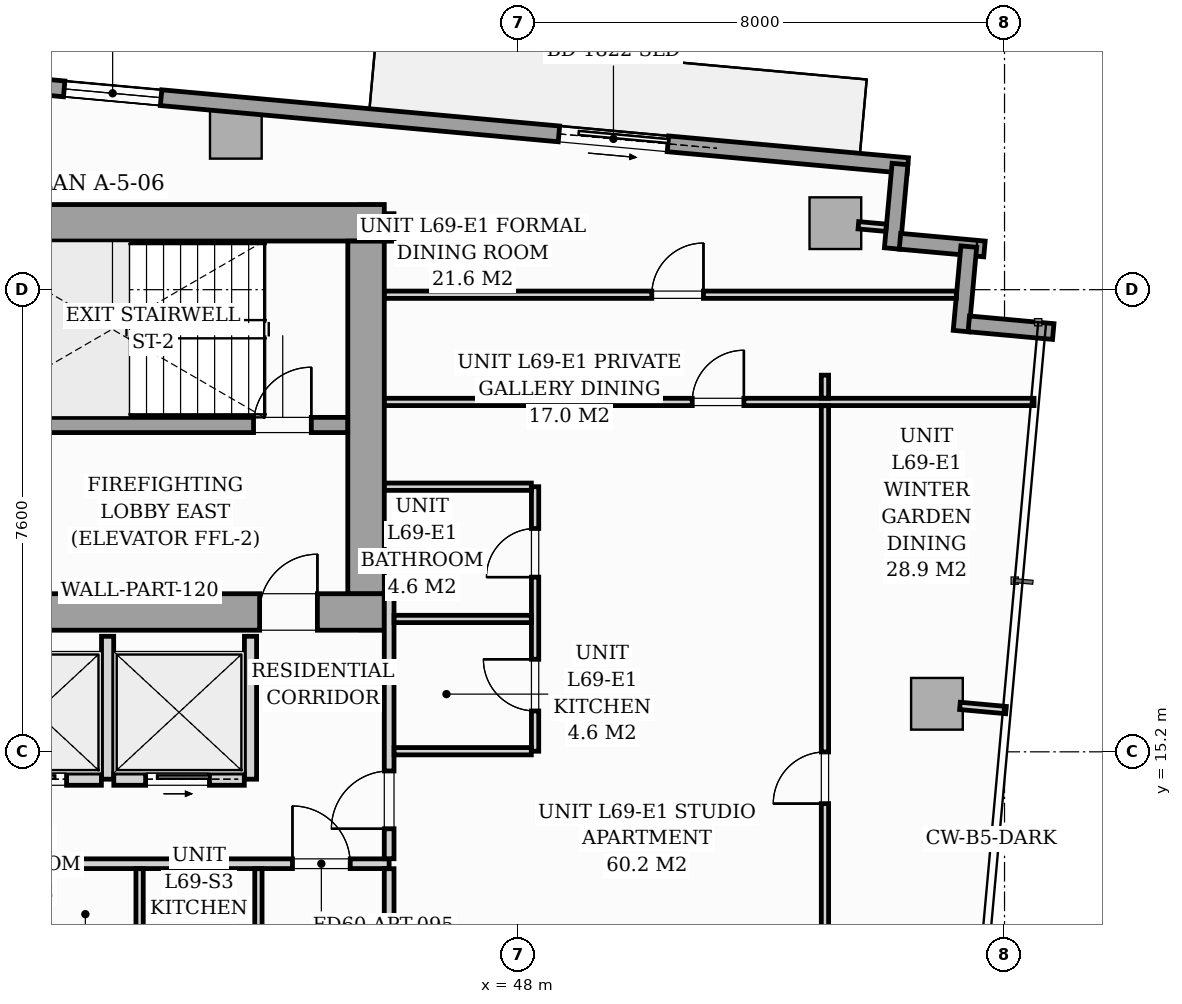
"""IFC4 building model, lengths in metres.
Left out: names, types, materials, properties, quantities, classifications, styles, units other than length and angle.
Written with IfcOpenShell. Run it as: python <this file> out.ifc"""

import sys

from ifc_helpers import new_model, si_unit, direction, frame, frame_2d, origin, origin_2d, place, context, subcontext, project, spatial, rectangle, i_section, extrude, source, transform, mapped, element, fill, save


model = new_model("IFC4")
c1 = context("Model", 3, precision=1e-05, world=origin(), true_north=direction((0.0, 1.0)))
c2 = subcontext(c1, "Body", "Model", "MODEL_VIEW")
j1 = project(units=[si_unit("LENGTHUNIT", "METRE"), si_unit("PLANEANGLEUNIT", "RADIAN")], contexts=[c1])
p1 = place(None, origin())
s1 = spatial("IfcSite", under=j1, at=p1, CompositionType="ELEMENT")
p2 = place(p1, origin())
s2 = spatial("IfcBuilding", under=s1, at=p2, CompositionType="ELEMENT")
p3 = place(p2, frame((0.0, 0.0, 239.7)))
s3 = spatial("IfcBuildingStorey", under=s2, at=p3, CompositionType="ELEMENT", Elevation=239.7)
m1 = source(origin(), c2, "Body", "SweptSolid", [
    extrude(i_section(OverallWidth=0.409, OverallDepth=0.425, WebThickness=0.033, FlangeThickness=0.052, FilletRadius=0.018, at=origin_2d()), origin(), (0.0, 0.0, 1.0), 3.296),
])
for number, where, z_axis, x_axis in (
    (1, (45.6, 17.4, 0.002), (0.0, 0.0, 1.0), (1.0, 0.0, 0.0)),
    (2, (45.6, 24.0, 0.002), (0.0, 0.0, 1.0), (1.0, 0.0, 0.0)),
):
    element("IfcColumn", number, at=place(p3, frame(where, z_axis=z_axis, x_axis=x_axis)), inside=s3, PredefinedType="PILASTER", context=c2, shape_type="MappedRepresentation", body=[
        mapped(m1, transform((0.0, 0.0, 0.0), scale=1.0)),
    ])
m2 = source(origin(), c2, "Body", "SweptSolid", [
    extrude(rectangle(XDim=0.85, YDim=0.85, at=origin_2d()), origin(), (0.0, 0.0, 1.0), 3.296),
])
for number, where, z_axis, x_axis in (
    (3, (43.359, 25.38, 0.002), (0.0, 0.0, 1.0), (0.996, -0.091, 0.0)),
    (4, (53.218, 23.894, 0.002), (0.0, 0.0, 1.0), (0.996, -0.091, 0.0)),
    (5, (54.889, 15.99, 0.002), (0.0, 0.0, 1.0), (0.996, -0.091, 0.0)),
):
    element("IfcColumn", number, at=place(p3, frame(where, z_axis=z_axis, x_axis=x_axis)), inside=s3, PredefinedType="COLUMN", context=c2, shape_type="MappedRepresentation", body=[
        mapped(m2, transform((0.0, 0.0, 0.0), scale=1.0)),
    ])
p4 = place(p3, frame((39.839, 26.166, 0.0), z_axis=(0.0, 0.0, 1.0), x_axis=(0.995884447498, -0.090632043071, 0.0)))
e6 = element("IfcWall", 6, at=p4, inside=s3, PredefinedType="STANDARD", context=c2, shape_type="SweptSolid", body=[
    extrude(rectangle(XDim=14.63, YDim=0.26, at=frame_2d((7.315, 0.0))), origin(), (0.0, 0.0, 1.0), 3.04),
])
p5 = place(p4, frame((8.87, 0.0, 0.0)))
e7 = element("IfcOpeningElement", 7, at=p5, cuts=e6, PredefinedType="OPENING", context=c2, shape_type="SweptSolid", body=[
    extrude(rectangle(XDim=1.8, YDim=2.06, at=frame_2d((0.9, 1.03))), frame((0.0, 0.14, 0.0), z_axis=(0.0, -1.0, 0.0), x_axis=(1.0, 0.0, 0.0)), (0.0, 0.0, 1.0), 0.28),
])
p6 = place(p4, frame((0.7, 0.0, 0.65)))
e8 = element("IfcOpeningElement", 8, at=p6, cuts=e6, PredefinedType="OPENING", context=c2, shape_type="SweptSolid", body=[
    extrude(rectangle(XDim=1.6, YDim=1.5, at=frame_2d((0.8, 0.75))), frame((0.0, 0.14, 0.0), z_axis=(0.0, -1.0, 0.0), x_axis=(1.0, 0.0, 0.0)), (0.0, 0.0, 1.0), 0.28),
])
p7 = place(p3, frame((54.281, 24.866, 0.0), z_axis=(0.0, 0.0, 1.0), x_axis=(-0.090661991521, -0.995881721538, 0.0)))
e9 = element("IfcWall", 9, at=p7, inside=s3, PredefinedType="STANDARD", context=c2, shape_type="SweptSolid", body=[
    extrude(rectangle(XDim=1.395, YDim=0.26, at=frame_2d((0.698, 0.0))), origin(), (0.0, 0.0, 1.0), 3.04),
])
for number, where, z_axis, x_axis in (
    (10, (54.281, 23.596, 0.0), (0.0, 0.0, 1.0), (0.996, -0.091, 0.0)),
    (11, (55.412, 23.508, 0.0), (0.0, 0.0, 1.0), (-0.091, -0.996, 0.0)),
    (12, (55.412, 22.238, 0.0), (0.0, 0.0, 1.0), (0.996, -0.091, 0.0)),
):
    element("IfcWall", number, at=place(p3, frame(where, z_axis=z_axis, x_axis=x_axis)), inside=s3, PredefinedType="STANDARD", context=c2, shape_type="SweptSolid", body=[
        extrude(rectangle(XDim=1.395, YDim=0.26, at=frame_2d((0.698, 0.0))), origin(), (0.0, 0.0, 1.0), 3.04),
    ])
p8 = place(p3, frame((26.2, 17.5, 0.0), z_axis=(0.0, 0.0, 1.0), x_axis=(1.0, 0.0, 0.0)))
e13 = element("IfcWall", 13, at=p8, inside=s3, PredefinedType="SHEAR", context=c2, shape_type="SweptSolid", body=[
    extrude(rectangle(XDim=19.6, YDim=0.6, at=frame_2d((9.8, 0.0))), origin(), (0.0, 0.0, 1.0), 3.3),
])
p9 = place(p8, frame((0.95, 0.0, 0.0)))
e14 = element("IfcOpeningElement", 14, at=p9, cuts=e13, PredefinedType="OPENING", context=c2, shape_type="SweptSolid", body=[
    extrude(rectangle(XDim=0.95, YDim=2.06, at=frame_2d((0.475, 1.03))), frame((0.0, 0.31, 0.0), z_axis=(0.0, -1.0, 0.0), x_axis=(1.0, 0.0, 0.0)), (0.0, 0.0, 1.0), 0.62),
])
p10 = place(p8, frame((9.38, 0.0, 0.0)))
e15 = element("IfcOpeningElement", 15, at=p10, cuts=e13, PredefinedType="OPENING", context=c2, shape_type="SweptSolid", body=[
    extrude(rectangle(XDim=0.85, YDim=2.0, at=frame_2d((0.425, 1.0))), frame((0.0, 0.31, 0.0), z_axis=(0.0, -1.0, 0.0), x_axis=(1.0, 0.0, 0.0)), (0.0, 0.0, 1.0), 0.62),
])
p11 = place(p8, frame((17.55, 0.0, 0.0)))
e16 = element("IfcOpeningElement", 16, at=p11, cuts=e13, PredefinedType="OPENING", context=c2, shape_type="SweptSolid", body=[
    extrude(rectangle(XDim=0.95, YDim=2.06, at=frame_2d((0.475, 1.03))), frame((0.0, 0.31, 0.0), z_axis=(0.0, -1.0, 0.0), x_axis=(1.0, 0.0, 0.0)), (0.0, 0.0, 1.0), 0.62),
])
p12 = place(p3, frame((26.2, 23.9, 0.0), z_axis=(0.0, 0.0, 1.0), x_axis=(1.0, 0.0, 0.0)))
e17 = element("IfcWall", 17, at=p12, inside=s3, PredefinedType="SHEAR", context=c2, shape_type="SweptSolid", body=[
    extrude(rectangle(XDim=19.6, YDim=0.6, at=frame_2d((9.8, 0.0))), origin(), (0.0, 0.0, 1.0), 3.3),
])
p13 = place(p3, frame((45.5, 17.802, 0.0), z_axis=(0.0, 0.0, 1.0), x_axis=(0.0, 1.0, 0.0)))
e18 = element("IfcWall", 18, at=p13, inside=s3, PredefinedType="SHEAR", context=c2, shape_type="SweptSolid", body=[
    extrude(rectangle(XDim=5.796, YDim=0.6, at=frame_2d((2.898, 0.0))), origin(), (0.0, 0.0, 1.0), 3.3),
])
p14 = place(p3, frame((37.05, 20.575, 0.0), z_axis=(0.0, 0.0, 1.0), x_axis=(1.0, 0.0, 0.0)))
e19 = element("IfcWall", 19, at=p14, inside=s3, PredefinedType="SOLIDWALL", context=c2, shape_type="SweptSolid", body=[
    extrude(rectangle(XDim=8.148, YDim=0.25, at=frame_2d((4.074, 0.0))), origin(), (0.0, 0.0, 1.0), 3.3),
])
p15 = place(p14, frame((6.6, 0.0, 0.0)))
e20 = element("IfcOpeningElement", 20, at=p15, cuts=e19, PredefinedType="OPENING", context=c2, shape_type="SweptSolid", body=[
    extrude(rectangle(XDim=0.95, YDim=2.06, at=frame_2d((0.475, 1.03))), frame((0.0, 0.135, 0.0), z_axis=(0.0, -1.0, 0.0), x_axis=(1.0, 0.0, 0.0)), (0.0, 0.0, 1.0), 0.27),
])
for number, where, z_axis, x_axis in (
    (21, (41.25, 14.75, 0.0), (0.0, 0.0, 1.0), (0.0, 1.0, 0.0)),
    (22, (43.6, 14.75, 0.0), (0.0, 0.0, 1.0), (0.0, 1.0, 0.0)),
):
    element("IfcWall", number, at=place(p3, frame(where, z_axis=z_axis, x_axis=x_axis)), inside=s3, PredefinedType="PARTITIONING", context=c2, shape_type="SweptSolid", body=[
        extrude(rectangle(XDim=2.35, YDim=0.2, at=frame_2d((1.175, 0.0))), origin(), (0.0, 0.0, 1.0), 3.04),
    ])
p16 = place(p3, frame((39.002, 14.75, 0.0), z_axis=(0.0, 0.0, 1.0), x_axis=(1.0, 0.0, 0.0)))
e23 = element("IfcWall", 23, at=p16, inside=s3, PredefinedType="PARTITIONING", context=c2, shape_type="SweptSolid", body=[
    extrude(rectangle(XDim=2.146, YDim=0.2, at=frame_2d((1.073, 0.0))), origin(), (0.0, 0.0, 1.0), 3.04),
])
p17 = place(p16, frame((0.523, 0.0, 0.0)))
e24 = element("IfcOpeningElement", 24, at=p17, cuts=e23, PredefinedType="OPENING", context=c2, shape_type="SweptSolid", body=[
    extrude(rectangle(XDim=1.05, YDim=2.08, at=frame_2d((0.525, 1.04))), frame((0.0, 0.11, 0.0), z_axis=(0.0, -1.0, 0.0), x_axis=(1.0, 0.0, 0.0)), (0.0, 0.0, 1.0), 0.22),
])
p18 = place(p3, frame((41.352, 14.75, 0.0), z_axis=(0.0, 0.0, 1.0), x_axis=(1.0, 0.0, 0.0)))
e25 = element("IfcWall", 25, at=p18, inside=s3, PredefinedType="PARTITIONING", context=c2, shape_type="SweptSolid", body=[
    extrude(rectangle(XDim=2.146, YDim=0.2, at=frame_2d((1.073, 0.0))), origin(), (0.0, 0.0, 1.0), 3.04),
])
p19 = place(p18, frame((0.523, 0.0, 0.0)))
e26 = element("IfcOpeningElement", 26, at=p19, cuts=e25, PredefinedType="OPENING", context=c2, shape_type="SweptSolid", body=[
    extrude(rectangle(XDim=1.05, YDim=2.08, at=frame_2d((0.525, 1.04))), frame((0.0, 0.11, 0.0), z_axis=(0.0, -1.0, 0.0), x_axis=(1.0, 0.0, 0.0)), (0.0, 0.0, 1.0), 0.22),
])
p20 = place(p3, frame((26.12, 13.36, 0.0), z_axis=(0.0, 0.0, 1.0), x_axis=(1.0, 0.0, 0.0)))
e27 = element("IfcWall", 27, at=p20, inside=s3, PredefinedType="PARTITIONING", context=c2, shape_type="SweptSolid", body=[
    extrude(rectangle(XDim=19.76, YDim=0.16, at=frame_2d((9.88, 0.0))), origin(), (0.0, 0.0, 1.0), 2.605),
])
p21 = place(p20, frame((5.221, 0.0, 0.0)))
e28 = element("IfcOpeningElement", 28, at=p21, cuts=e27, PredefinedType="OPENING", context=c2, shape_type="SweptSolid", body=[
    extrude(rectangle(XDim=0.95, YDim=2.06, at=frame_2d((0.475, 1.03))), frame((0.0, 0.09, 0.0), z_axis=(0.0, -1.0, 0.0), x_axis=(1.0, 0.0, 0.0)), (0.0, 0.0, 1.0), 0.18),
])
p22 = place(p20, frame((8.074, 0.0, 0.0)))
e29 = element("IfcOpeningElement", 29, at=p22, cuts=e27, PredefinedType="OPENING", context=c2, shape_type="SweptSolid", body=[
    extrude(rectangle(XDim=0.95, YDim=2.06, at=frame_2d((0.475, 1.03))), frame((0.0, 0.09, 0.0), z_axis=(0.0, -1.0, 0.0), x_axis=(1.0, 0.0, 0.0)), (0.0, 0.0, 1.0), 0.18),
])
p23 = place(p20, frame((18.17, 0.0, 0.0)))
e30 = element("IfcOpeningElement", 30, at=p23, cuts=e27, PredefinedType="OPENING", context=c2, shape_type="SweptSolid", body=[
    extrude(rectangle(XDim=0.95, YDim=2.06, at=frame_2d((0.475, 1.03))), frame((0.0, 0.09, 0.0), z_axis=(0.0, -1.0, 0.0), x_axis=(1.0, 0.0, 0.0)), (0.0, 0.0, 1.0), 0.18),
])
p24 = place(p3, frame((45.88, 8.136, 0.0), z_axis=(0.0, 0.0, 1.0), x_axis=(0.0, 1.0, 0.0)))
e31 = element("IfcWall", 31, at=p24, inside=s3, PredefinedType="PARTITIONING", context=c2, shape_type="SweptSolid", body=[
    extrude(rectangle(XDim=5.142, YDim=0.16, at=frame_2d((2.571, 0.0))), origin(), (0.0, 0.0, 1.0), 3.04),
])
p25 = place(p3, frame((45.88, 13.442, 0.0), z_axis=(0.0, 0.0, 1.0), x_axis=(0.0, 1.0, 0.0)))
e32 = element("IfcWall", 32, at=p25, inside=s3, PredefinedType="PARTITIONING", context=c2, shape_type="SweptSolid", body=[
    extrude(rectangle(XDim=4.36, YDim=0.16, at=frame_2d((2.18, 0.0))), origin(), (0.0, 0.0, 1.0), 3.04),
])
p26 = place(p25, frame((0.493, 0.0, 0.0)))
e33 = element("IfcOpeningElement", 33, at=p26, cuts=e32, PredefinedType="OPENING", context=c2, shape_type="SweptSolid", body=[
    extrude(rectangle(XDim=0.95, YDim=2.06, at=frame_2d((0.475, 1.03))), frame((0.0, 0.09, 0.0), z_axis=(0.0, -1.0, 0.0), x_axis=(1.0, 0.0, 0.0)), (0.0, 0.0, 1.0), 0.18),
])
p27 = place(p3, frame((45.88, 23.598, 0.0), z_axis=(0.0, 0.0, 1.0), x_axis=(0.0, 1.0, 0.0)))
e34 = element("IfcWall", 34, at=p27, inside=s3, PredefinedType="PARTITIONING", context=c2, shape_type="SweptSolid", body=[
    extrude(rectangle(XDim=0.452, YDim=0.16, at=frame_2d((0.226, 0.0))), origin(), (0.0, 0.0, 1.0), 3.04),
])
for number, where, z_axis, x_axis in (
    (35, (43.73, 11.172, 0.0), (0.0, 0.0, 1.0), (0.0, 1.0, 0.0)),
    (36, (41.776, 11.172, 0.0), (0.0, 0.0, 1.0), (0.0, 1.0, 0.0)),
):
    element("IfcWall", number, at=place(p3, frame(where, z_axis=z_axis, x_axis=x_axis)), inside=s3, PredefinedType="PARTITIONING", context=c2, shape_type="SweptSolid", body=[
        extrude(rectangle(XDim=2.106, YDim=0.12, at=frame_2d((1.053, 0.0))), origin(), (0.0, 0.0, 1.0), 3.04),
    ])
p28 = place(p3, frame((48.28, 15.21, 0.0), z_axis=(0.0, 0.0, 1.0), x_axis=(0.0, 1.0, 0.0)))
e37 = element("IfcWall", 37, at=p28, inside=s3, PredefinedType="PARTITIONING", context=c2, shape_type="SweptSolid", body=[
    extrude(rectangle(XDim=4.35, YDim=0.12, at=frame_2d((2.175, 0.0))), origin(), (0.0, 0.0, 1.0), 3.04),
])
p29 = place(p28, frame((0.662, 0.0, 0.0)))
e38 = element("IfcOpeningElement", 38, at=p29, cuts=e37, PredefinedType="OPENING", context=c2, shape_type="SweptSolid", body=[
    extrude(rectangle(XDim=0.85, YDim=2.05, at=frame_2d((0.425, 1.025))), frame((0.0, 0.07, 0.0), z_axis=(0.0, -1.0, 0.0), x_axis=(1.0, 0.0, 0.0)), (0.0, 0.0, 1.0), 0.14),
])
p30 = place(p28, frame((2.863, 0.0, 0.0)))
e39 = element("IfcOpeningElement", 39, at=p30, cuts=e37, PredefinedType="OPENING", context=c2, shape_type="SweptSolid", body=[
    extrude(rectangle(XDim=0.8, YDim=2.02, at=frame_2d((0.4, 1.01))), frame((0.0, 0.07, 0.0), z_axis=(0.0, -1.0, 0.0), x_axis=(1.0, 0.0, 0.0)), (0.0, 0.0, 1.0), 0.14),
])
p31 = place(p3, frame((45.962, 17.385, 0.0), z_axis=(0.0, 0.0, 1.0), x_axis=(1.0, 0.0, 0.0)))
e40 = element("IfcWall", 40, at=p31, inside=s3, PredefinedType="PARTITIONING", context=c2, shape_type="SweptSolid", body=[
    extrude(rectangle(XDim=2.256, YDim=0.12, at=frame_2d((1.128, 0.0))), origin(), (0.0, 0.0, 1.0), 2.381),
])
p32 = place(p3, frame((45.962, 15.21, 0.0), z_axis=(0.0, 0.0, 1.0), x_axis=(1.0, 0.0, 0.0)))
e41 = element("IfcWall", 41, at=p32, inside=s3, PredefinedType="PARTITIONING", context=c2, shape_type="SweptSolid", body=[
    extrude(rectangle(XDim=2.256, YDim=0.12, at=frame_2d((1.128, 0.0))), origin(), (0.0, 0.0, 1.0), 3.04),
])
p33 = place(p3, frame((45.802, 19.56, 0.0), z_axis=(0.0, 0.0, 1.0), x_axis=(1.0, 0.0, 0.0)))
e42 = element("IfcWall", 42, at=p33, inside=s3, PredefinedType="PARTITIONING", context=c2, shape_type="SweptSolid", body=[
    extrude(rectangle(XDim=2.416, YDim=0.12, at=frame_2d((1.208, 0.0))), origin(), (0.0, 0.0, 1.0), 3.04),
])
p34 = place(p3, frame((45.802, 22.717, 0.0), z_axis=(0.0, 0.0, 1.0), x_axis=(1.0, 0.0, 0.0)))
e43 = element("IfcWall", 43, at=p34, inside=s3, PredefinedType="PARTITIONING", context=c2, shape_type="SweptSolid", body=[
    extrude(rectangle(XDim=9.406, YDim=0.12, at=frame_2d((4.703, 0.0))), origin(), (0.0, 0.0, 1.0), 3.04),
])
p35 = place(p34, frame((4.397, 0.0, 0.0)))
e44 = element("IfcOpeningElement", 44, at=p35, cuts=e43, PredefinedType="OPENING", context=c2, shape_type="SweptSolid", body=[
    extrude(rectangle(XDim=0.85, YDim=2.05, at=frame_2d((0.425, 1.025))), frame((0.0, 0.07, 0.0), z_axis=(0.0, -1.0, 0.0), x_axis=(1.0, 0.0, 0.0)), (0.0, 0.0, 1.0), 0.14),
])
p36 = place(p3, frame((45.802, 20.954, 0.0), z_axis=(0.0, 0.0, 1.0), x_axis=(1.0, 0.0, 0.0)))
e45 = element("IfcWall", 45, at=p36, inside=s3, PredefinedType="PARTITIONING", context=c2, shape_type="SweptSolid", body=[
    extrude(rectangle(XDim=10.683, YDim=0.12, at=frame_2d((5.342, 0.0))), origin(), (0.0, 0.0, 1.0), 3.04),
])
p37 = place(p36, frame((5.062, 0.0, 0.0)))
e46 = element("IfcOpeningElement", 46, at=p37, cuts=e45, PredefinedType="OPENING", context=c2, shape_type="SweptSolid", body=[
    extrude(rectangle(XDim=0.85, YDim=2.05, at=frame_2d((0.425, 1.025))), frame((0.0, 0.07, 0.0), z_axis=(0.0, -1.0, 0.0), x_axis=(1.0, 0.0, 0.0)), (0.0, 0.0, 1.0), 0.14),
])
p38 = place(p3, frame((53.047, 10.808, 0.0), z_axis=(0.0, 0.0, 1.0), x_axis=(0.0, 1.0, 0.0)))
e47 = element("IfcWall", 47, at=p38, inside=s3, PredefinedType="PARTITIONING", context=c2, shape_type="SweptSolid", body=[
    extrude(rectangle(XDim=10.084, YDim=0.12, at=frame_2d((5.042, 0.0))), origin(), (0.0, 0.0, 1.0), 3.04),
])
p39 = place(p38, frame((3.54, 0.0, 0.0)))
e48 = element("IfcOpeningElement", 48, at=p39, cuts=e47, PredefinedType="OPENING", context=c2, shape_type="SweptSolid", body=[
    extrude(rectangle(XDim=0.85, YDim=2.05, at=frame_2d((0.425, 1.025))), frame((0.0, 0.07, 0.0), z_axis=(0.0, -1.0, 0.0), x_axis=(1.0, 0.0, 0.0)), (0.0, 0.0, 1.0), 0.14),
])
p40 = place(p3, frame((53.047, 21.016, 0.0), z_axis=(0.0, 0.0, 1.0), x_axis=(0.0, 1.0, 0.0)))
e49 = element("IfcWall", 49, at=p40, inside=s3, PredefinedType="PARTITIONING", context=c2, shape_type="SweptSolid", body=[
    extrude(rectangle(XDim=0.378, YDim=0.12, at=frame_2d((0.189, 0.0))), origin(), (0.0, 0.0, 1.0), 3.04),
])
p41 = place(p3, frame((53.597, 23.859, 0.0), z_axis=(0.0, 0.0, 1.0), x_axis=(0.995884462012, -0.090631883588, 0.0)))
e50 = element("IfcWall", 50, at=p41, inside=s3, PredefinedType="PARTITIONING", context=c2, shape_type="SweptSolid", body=[
    extrude(rectangle(XDim=0.458, YDim=0.12, at=frame_2d((0.229, 0.0))), origin(), (0.0, 0.0, 1.0), 3.04),
])
p42 = place(p3, frame((55.267, 15.955, 0.0), z_axis=(0.0, 0.0, 1.0), x_axis=(0.995887938321, -0.09059367697, 0.0)))
e51 = element("IfcWall", 51, at=p42, inside=s3, PredefinedType="PARTITIONING", context=c2, shape_type="SweptSolid", body=[
    extrude(rectangle(XDim=0.76, YDim=0.12, at=frame_2d((0.38, 0.0))), origin(), (0.0, 0.0, 1.0), 3.04),
])
m3 = source(origin(), c2, "Body", "SweptSolid", [
    extrude(rectangle(XDim=1.8, YDim=2.06, at=frame_2d((0.9, 1.03))), frame((0.0, 0.025, 0.0), z_axis=(0.0, -1.0, 0.0), x_axis=(1.0, 0.0, 0.0)), (0.0, 0.0, 1.0), 0.05),
])
p43 = place(p5, origin())
e52 = element("IfcDoor", 52, at=p43, inside=s3, OperationType="SLIDING_TO_RIGHT", PredefinedType="DOOR", context=c2, shape_type="MappedRepresentation", body=[
    mapped(m3, transform((0.0, 0.0, 0.0), scale=1.0)),
])
fill(e7, e52)
m4 = source(origin(), c2, "Body", "SweptSolid", [
    extrude(rectangle(XDim=1.6, YDim=1.5, at=frame_2d((0.8, 0.75))), frame((0.0, 0.03, 0.0), z_axis=(0.0, -1.0, 0.0), x_axis=(1.0, 0.0, 0.0)), (0.0, 0.0, 1.0), 0.06),
])
p44 = place(p6, origin())
e53 = element("IfcWindow", 53, at=p44, inside=s3, PartitioningType="SINGLE_PANEL", PredefinedType="WINDOW", context=c2, shape_type="MappedRepresentation", body=[
    mapped(m4, transform((0.0, 0.0, 0.0), scale=1.0)),
])
fill(e8, e53)
m5 = source(origin(), c2, "Body", "SweptSolid", [
    extrude(rectangle(XDim=0.95, YDim=2.06, at=frame_2d((0.475, 1.03))), frame((0.0, 0.025, 0.0), z_axis=(0.0, -1.0, 0.0), x_axis=(1.0, 0.0, 0.0)), (0.0, 0.0, 1.0), 0.05),
])
p45 = place(p11, origin())
e54 = element("IfcDoor", 54, at=p45, inside=s3, OperationType="SINGLE_SWING_RIGHT", PredefinedType="DOOR", context=c2, shape_type="MappedRepresentation", body=[
    mapped(m5, transform((0.0, 0.0, 0.0), scale=1.0)),
])
fill(e16, e54)
p46 = place(p15, origin())
e55 = element("IfcDoor", 55, at=p46, inside=s3, OperationType="SINGLE_SWING_RIGHT", PredefinedType="DOOR", context=c2, shape_type="MappedRepresentation", body=[
    mapped(m5, transform((0.0, 0.0, 0.0), scale=1.0)),
])
fill(e20, e55)
m6 = source(origin(), c2, "Body", "SweptSolid", [
    extrude(rectangle(XDim=1.05, YDim=2.08, at=frame_2d((0.525, 1.04))), frame((0.0, 0.025, 0.0), z_axis=(0.0, -1.0, 0.0), x_axis=(1.0, 0.0, 0.0)), (0.0, 0.0, 1.0), 0.05),
])
p47 = place(p17, origin())
e56 = element("IfcDoor", 56, at=p47, inside=s3, OperationType="SLIDING_TO_LEFT", PredefinedType="DOOR", context=c2, shape_type="MappedRepresentation", body=[
    mapped(m6, transform((0.0, 0.0, 0.0), scale=1.0)),
])
fill(e24, e56)
p48 = place(p19, origin())
e57 = element("IfcDoor", 57, at=p48, inside=s3, OperationType="SLIDING_TO_RIGHT", PredefinedType="DOOR", context=c2, shape_type="MappedRepresentation", body=[
    mapped(m6, transform((0.0, 0.0, 0.0), scale=1.0)),
])
fill(e26, e57)
m7 = source(origin(), c2, "Body", "SweptSolid", [
    extrude(rectangle(XDim=0.95, YDim=2.06, at=frame_2d((0.475, 1.03))), frame((0.0, 0.025, 0.0), z_axis=(0.0, -1.0, 0.0), x_axis=(1.0, 0.0, 0.0)), (0.0, 0.0, 1.0), 0.05),
])
p49 = place(p23, origin())
e58 = element("IfcDoor", 58, at=p49, inside=s3, OperationType="SINGLE_SWING_LEFT", PredefinedType="DOOR", context=c2, shape_type="MappedRepresentation", body=[
    mapped(m7, transform((0.0, 0.0, 0.0), scale=1.0)),
])
fill(e30, e58)
p50 = place(p26, origin())
e59 = element("IfcDoor", 59, at=p50, inside=s3, OperationType="SINGLE_SWING_LEFT", PredefinedType="DOOR", context=c2, shape_type="MappedRepresentation", body=[
    mapped(m7, transform((0.0, 0.0, 0.0), scale=1.0)),
])
fill(e33, e59)
m8 = source(origin(), c2, "Body", "SweptSolid", [
    extrude(rectangle(XDim=0.85, YDim=2.05, at=frame_2d((0.425, 1.025))), frame((0.0, 0.025, 0.0), z_axis=(0.0, -1.0, 0.0), x_axis=(1.0, 0.0, 0.0)), (0.0, 0.0, 1.0), 0.05),
])
p51 = place(p29, origin())
e60 = element("IfcDoor", 60, at=p51, inside=s3, OperationType="SINGLE_SWING_RIGHT", PredefinedType="DOOR", context=c2, shape_type="MappedRepresentation", body=[
    mapped(m8, transform((0.0, 0.0, 0.0), scale=1.0)),
])
fill(e38, e60)
m9 = source(origin(), c2, "Body", "SweptSolid", [
    extrude(rectangle(XDim=0.8, YDim=2.02, at=frame_2d((0.4, 1.01))), frame((0.0, 0.025, 0.0), z_axis=(0.0, -1.0, 0.0), x_axis=(1.0, 0.0, 0.0)), (0.0, 0.0, 1.0), 0.05),
])
p52 = place(p30, origin())
e61 = element("IfcDoor", 61, at=p52, inside=s3, OperationType="SINGLE_SWING_LEFT", PredefinedType="DOOR", context=c2, shape_type="MappedRepresentation", body=[
    mapped(m9, transform((0.0, 0.0, 0.0), scale=1.0)),
])
fill(e39, e61)
p53 = place(p35, origin())
e62 = element("IfcDoor", 62, at=p53, inside=s3, OperationType="SINGLE_SWING_RIGHT", PredefinedType="DOOR", context=c2, shape_type="MappedRepresentation", body=[
    mapped(m8, transform((0.0, 0.0, 0.0), scale=1.0)),
])
fill(e44, e62)
p54 = place(p37, origin())
e63 = element("IfcDoor", 63, at=p54, inside=s3, OperationType="SINGLE_SWING_RIGHT", PredefinedType="DOOR", context=c2, shape_type="MappedRepresentation", body=[
    mapped(m8, transform((0.0, 0.0, 0.0), scale=1.0)),
])
fill(e46, e63)
p55 = place(p39, origin())
e64 = element("IfcDoor", 64, at=p55, inside=s3, OperationType="SINGLE_SWING_LEFT", PredefinedType="DOOR", context=c2, shape_type="MappedRepresentation", body=[
    mapped(m8, transform((0.0, 0.0, 0.0), scale=1.0)),
])
fill(e48, e64)
save(model, sys.argv[1])
